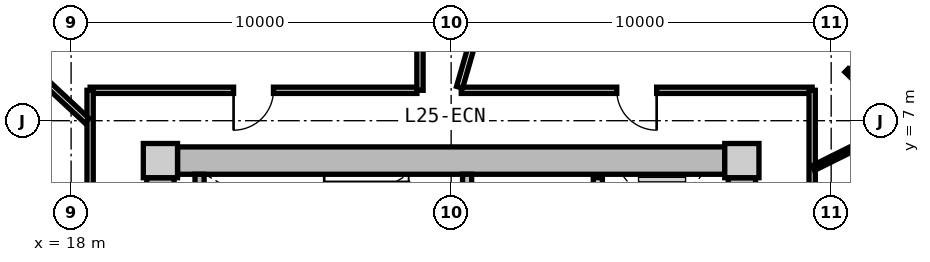
"""IFC4 building model, lengths in metres.
Left out: names, types, materials, properties, quantities, classifications, styles, units other than length and angle.
Written with IfcOpenShell. Run it as: python <this file> out.ifc"""

import sys

from ifc_helpers import new_model, si_unit, direction, frame, frame_2d, origin, origin_2d, place, context, subcontext, project, spatial, rectangle, extrude, source, transform, mapped, element, fill, save


model = new_model("IFC4")
c1 = context("Model", 3, precision=1e-05, world=origin(), true_north=direction((0.0, 1.0)))
c2 = subcontext(c1, "Body", "Model", "MODEL_VIEW")
j1 = project(units=[si_unit("LENGTHUNIT", "METRE"), si_unit("PLANEANGLEUNIT", "RADIAN")], contexts=[c1])
p1 = place(None, origin())
s1 = spatial("IfcSite", under=j1, at=p1, CompositionType="ELEMENT")
p2 = place(p1, origin())
s2 = spatial("IfcBuilding", under=s1, at=p2, CompositionType="ELEMENT")
p3 = place(p2, frame((0.0, 0.0, 84.05)))
s3 = spatial("IfcBuildingStorey", under=s2, at=p3, CompositionType="ELEMENT", Elevation=84.05)
m1 = source(origin(), c2, "Body", "SweptSolid", [
    extrude(rectangle(XDim=0.9, YDim=0.9, at=origin_2d()), origin(), (0.0, 0.0, 1.0), 3.05),
])
for number, where, z_axis, x_axis in (
    (1, (35.65, 5.95, 0.0), (0.0, 0.0, 1.0), (1.0, 0.0, 0.0)),
    (2, (20.35, 5.95, 0.0), (0.0, 0.0, 1.0), (1.0, 0.0, 0.0)),
):
    element("IfcColumn", number, at=place(p3, frame(where, z_axis=z_axis, x_axis=x_axis)), inside=s3, PredefinedType="COLUMN", context=c2, shape_type="MappedRepresentation", body=[
        mapped(m1, transform((0.0, 0.0, 0.0), x_axis=(1.0, 0.0, 0.0), y_axis=(0.0, 1.0, 0.0), z_axis=(0.0, 0.0, 1.0), scale=1.0)),
    ])
m2 = source(origin(), c2, "Body", "SweptSolid", [
    extrude(rectangle(XDim=14.4, YDim=0.72, at=frame_2d((7.2, 0.0))), origin(), (0.0, 0.0, 1.0), 2.79),
])
p4 = place(p3, frame((20.8, 5.95, 0.0), z_axis=(0.0, 0.0, 1.0), x_axis=(1.0, 0.0, 0.0)))
e3 = element("IfcWall", 3, at=p4, inside=s3, PredefinedType="SHEAR", context=c2, shape_type="MappedRepresentation", body=[
    mapped(m2, transform((0.0, 0.0, 0.0), x_axis=(1.0, 0.0, 0.0), y_axis=(0.0, 1.0, 0.0), z_axis=(0.0, 0.0, 1.0), scale=1.0)),
])
m3 = source(origin(), c2, "Body", "SweptSolid", [
    extrude(rectangle(XDim=11.0, YDim=0.72, at=frame_2d((5.5, 0.0))), origin(), (0.0, 0.0, 1.0), 2.79),
])
p5 = place(p3, frame((20.35, -5.5, 0.0), z_axis=(0.0, 0.0, 1.0), x_axis=(0.0, 1.0, 0.0)))
e4 = element("IfcWall", 4, at=p5, inside=s3, PredefinedType="SHEAR", context=c2, shape_type="MappedRepresentation", body=[
    mapped(m3, transform((0.0, 0.0, 0.0), x_axis=(1.0, 0.0, 0.0), y_axis=(0.0, 1.0, 0.0), z_axis=(0.0, 0.0, 1.0), scale=1.0)),
])
p6 = place(p5, frame((3.8, 0.0, 0.0)))
e5 = element("IfcOpeningElement", 5, at=p6, cuts=e4, PredefinedType="OPENING", context=c2, shape_type="SweptSolid", body=[
    extrude(rectangle(XDim=1.2, YDim=2.15, at=frame_2d((0.6, 1.075))), frame((0.0, 0.37, 0.0), z_axis=(0.0, -1.0, 0.0), x_axis=(1.0, 0.0, 0.0)), (0.0, 0.0, 1.0), 0.74),
])
p7 = place(p3, frame((35.65, 5.5, 0.0), z_axis=(0.0, 0.0, 1.0), x_axis=(0.0, -1.0, 0.0)))
e6 = element("IfcWall", 6, at=p7, inside=s3, PredefinedType="SHEAR", context=c2, shape_type="MappedRepresentation", body=[
    mapped(m3, transform((0.0, 0.0, 0.0), x_axis=(1.0, 0.0, 0.0), y_axis=(0.0, 1.0, 0.0), z_axis=(0.0, 0.0, 1.0), scale=1.0)),
])
p8 = place(p7, frame((5.65, 0.0, 0.0)))
e7 = element("IfcOpeningElement", 7, at=p8, cuts=e6, PredefinedType="OPENING", context=c2, shape_type="SweptSolid", body=[
    extrude(rectangle(XDim=1.2, YDim=2.15, at=frame_2d((0.6, 1.075))), frame((0.0, 0.37, 0.0), z_axis=(0.0, -1.0, 0.0), x_axis=(1.0, 0.0, 0.0)), (0.0, 0.0, 1.0), 0.74),
])
m4 = source(origin(), c2, "Body", "SweptSolid", [
    extrude(rectangle(XDim=3.14, YDim=0.24, at=frame_2d((1.57, 0.0))), origin(), (0.0, 0.0, 1.0), 2.79),
])
p9 = place(p3, frame((21.38, 2.45, 0.0), z_axis=(0.0, 0.0, 1.0), x_axis=(0.0, 1.0, 0.0)))
e8 = element("IfcWall", 8, at=p9, inside=s3, PredefinedType="PARTITIONING", context=c2, shape_type="MappedRepresentation", body=[
    mapped(m4, transform((0.0, 0.0, 0.0), x_axis=(1.0, 0.0, 0.0), y_axis=(0.0, 1.0, 0.0), z_axis=(0.0, 0.0, 1.0), scale=1.0)),
])
p10 = place(p3, frame((28.42, 2.45, 0.0), z_axis=(0.0, 0.0, 1.0), x_axis=(0.0, 1.0, 0.0)))
e9 = element("IfcWall", 9, at=p10, inside=s3, PredefinedType="PARTITIONING", context=c2, shape_type="MappedRepresentation", body=[
    mapped(m4, transform((0.0, 0.0, 0.0), x_axis=(1.0, 0.0, 0.0), y_axis=(0.0, 1.0, 0.0), z_axis=(0.0, 0.0, 1.0), scale=1.0)),
])
p11 = place(p10, frame((0.55, 0.0, 0.0)))
e10 = element("IfcOpeningElement", 10, at=p11, cuts=e9, PredefinedType="OPENING", context=c2, shape_type="SweptSolid", body=[
    extrude(rectangle(XDim=1.1, YDim=2.15, at=frame_2d((0.55, 1.075))), frame((0.0, 0.13, 0.0), z_axis=(0.0, -1.0, 0.0), x_axis=(1.0, 0.0, 0.0)), (0.0, 0.0, 1.0), 0.26),
])
m5 = source(origin(), c2, "Body", "SweptSolid", [
    extrude(rectangle(XDim=5.0, YDim=0.24, at=frame_2d((2.5, 0.0))), origin(), (0.0, 0.0, 1.0), 2.775),
])
p12 = place(p3, frame((31.86, 0.5, 0.0), z_axis=(0.0, 0.0, 1.0), x_axis=(0.0, 1.0, 0.0)))
e11 = element("IfcWall", 11, at=p12, inside=s3, PredefinedType="PARTITIONING", context=c2, shape_type="MappedRepresentation", body=[
    mapped(m5, transform((0.0, 0.0, 0.0), x_axis=(1.0, 0.0, 0.0), y_axis=(0.0, 1.0, 0.0), z_axis=(0.0, 0.0, 1.0), scale=1.0)),
])
p13 = place(p12, frame((3.05, 0.0, 0.0)))
e12 = element("IfcOpeningElement", 12, at=p13, cuts=e11, PredefinedType="OPENING", context=c2, shape_type="SweptSolid", body=[
    extrude(rectangle(XDim=1.3, YDim=2.2, at=frame_2d((0.65, 1.1))), frame((0.0, 0.13, 0.0), z_axis=(0.0, -1.0, 0.0), x_axis=(1.0, 0.0, 0.0)), (0.0, 0.0, 1.0), 0.26),
])
p14 = place(p12, frame((0.55, 0.0, 0.0)))
e13 = element("IfcOpeningElement", 13, at=p14, cuts=e11, PredefinedType="OPENING", context=c2, shape_type="SweptSolid", body=[
    extrude(rectangle(XDim=1.3, YDim=2.2, at=frame_2d((0.65, 1.1))), frame((0.0, 0.13, 0.0), z_axis=(0.0, -1.0, 0.0), x_axis=(1.0, 0.0, 0.0)), (0.0, 0.0, 1.0), 0.26),
])
m6 = source(origin(), c2, "Body", "SweptSolid", [
    extrude(rectangle(XDim=8.6, YDim=0.165, at=frame_2d((4.3, 0.0))), origin(), (0.0, 0.0, 1.0), 2.775),
])
p15 = place(p3, frame((18.5, 7.8, 0.0), z_axis=(0.0, 0.0, 1.0), x_axis=(1.0, 0.0, 0.0)))
e14 = element("IfcWall", 14, at=p15, inside=s3, PredefinedType="PARTITIONING", context=c2, shape_type="MappedRepresentation", body=[
    mapped(m6, transform((0.0, 0.0, 0.0), x_axis=(1.0, 0.0, 0.0), y_axis=(0.0, 1.0, 0.0), z_axis=(0.0, 0.0, 1.0), scale=1.0)),
])
p16 = place(p15, frame((3.775, 0.0, 0.0)))
e15 = element("IfcOpeningElement", 15, at=p16, cuts=e14, PredefinedType="OPENING", context=c2, shape_type="SweptSolid", body=[
    extrude(rectangle(XDim=1.05, YDim=2.15, at=frame_2d((0.525, 1.075))), frame((0.0, 0.093, 0.0), z_axis=(0.0, -1.0, 0.0), x_axis=(1.0, 0.0, 0.0)), (0.0, 0.0, 1.0), 0.185),
])
m7 = source(origin(), c2, "Body", "SweptSolid", [
    extrude(rectangle(XDim=9.234, YDim=0.165, at=frame_2d((4.617, 0.0))), origin(), (0.0, 0.0, 1.0), 2.775),
])
p17 = place(p3, frame((28.266, 7.8, 0.0), z_axis=(0.0, 0.0, 1.0), x_axis=(1.0, 0.0, 0.0)))
e16 = element("IfcWall", 16, at=p17, inside=s3, PredefinedType="PARTITIONING", context=c2, shape_type="MappedRepresentation", body=[
    mapped(m7, transform((0.0, 0.0, 0.0), x_axis=(1.0, 0.0, 0.0), y_axis=(0.0, 1.0, 0.0), z_axis=(0.0, 0.0, 1.0), scale=1.0)),
])
p18 = place(p17, frame((4.092, 0.0, 0.0)))
e17 = element("IfcOpeningElement", 17, at=p18, cuts=e16, PredefinedType="OPENING", context=c2, shape_type="SweptSolid", body=[
    extrude(rectangle(XDim=1.05, YDim=2.15, at=frame_2d((0.525, 1.075))), frame((0.0, 0.093, 0.0), z_axis=(0.0, -1.0, 0.0), x_axis=(1.0, 0.0, 0.0)), (0.0, 0.0, 1.0), 0.185),
])
m8 = source(origin(), c2, "Body", "SweptSolid", [
    extrude(rectangle(XDim=15.6, YDim=0.165, at=frame_2d((7.8, 0.0))), origin(), (0.0, 0.0, 1.0), 2.775),
])
p19 = place(p3, frame((18.5, -7.8, 0.0), z_axis=(0.0, 0.0, 1.0), x_axis=(0.0, 1.0, 0.0)))
e18 = element("IfcWall", 18, at=p19, inside=s3, PredefinedType="PARTITIONING", context=c2, shape_type="MappedRepresentation", body=[
    mapped(m8, transform((0.0, 0.0, 0.0), x_axis=(1.0, 0.0, 0.0), y_axis=(0.0, 1.0, 0.0), z_axis=(0.0, 0.0, 1.0), scale=1.0)),
])
p20 = place(p19, frame((7.134, 0.0, 0.0)))
e19 = element("IfcOpeningElement", 19, at=p20, cuts=e18, PredefinedType="OPENING", context=c2, shape_type="SweptSolid", body=[
    extrude(rectangle(XDim=1.25, YDim=2.2, at=frame_2d((0.625, 1.1))), frame((0.0, 0.093, 0.0), z_axis=(0.0, -1.0, 0.0), x_axis=(1.0, 0.0, 0.0)), (0.0, 0.0, 1.0), 0.185),
])
p21 = place(p3, frame((37.5, 7.8, 0.0), z_axis=(0.0, 0.0, 1.0), x_axis=(0.0, -1.0, 0.0)))
e20 = element("IfcWall", 20, at=p21, inside=s3, PredefinedType="PARTITIONING", context=c2, shape_type="MappedRepresentation", body=[
    mapped(m8, transform((0.0, 0.0, 0.0), x_axis=(1.0, 0.0, 0.0), y_axis=(0.0, 1.0, 0.0), z_axis=(0.0, 0.0, 1.0), scale=1.0)),
])
p22 = place(p21, frame((9.177, 0.0, 0.0)))
e21 = element("IfcOpeningElement", 21, at=p22, cuts=e20, PredefinedType="OPENING", context=c2, shape_type="SweptSolid", body=[
    extrude(rectangle(XDim=1.05, YDim=2.15, at=frame_2d((0.525, 1.075))), frame((0.0, 0.093, 0.0), z_axis=(0.0, -1.0, 0.0), x_axis=(1.0, 0.0, 0.0)), (0.0, 0.0, 1.0), 0.185),
])
m9 = source(origin(), c2, "Body", "SweptSolid", [
    extrude(rectangle(XDim=8.989, YDim=0.165, at=frame_2d((4.495, 0.0))), origin(), (0.0, 0.0, 1.0), 2.275),
])
p23 = place(p3, frame((28.222, 7.88, 0.0), z_axis=(0.0, 0.0, 1.0), x_axis=(0.27702323008, 0.960863221274, 0.0)))
e22 = element("IfcWall", 22, at=p23, inside=s3, PredefinedType="PARTITIONING", context=c2, shape_type="MappedRepresentation", body=[
    mapped(m9, transform((0.0, 0.0, 0.0), x_axis=(1.0, 0.0, 0.0), y_axis=(0.0, 1.0, 0.0), z_axis=(0.0, 0.0, 1.0), scale=1.0)),
])
m10 = source(origin(), c2, "Body", "SweptSolid", [
    extrude(rectangle(XDim=7.482, YDim=0.165, at=frame_2d((3.741, 0.0))), origin(), (0.0, 0.0, 1.0), 2.275),
])
p24 = place(p3, frame((18.42, 6.998, 0.0), z_axis=(0.0, 0.0, 1.0), x_axis=(-0.732508698043, 0.680757671489, 0.0)))
e23 = element("IfcWall", 23, at=p24, inside=s3, PredefinedType="PARTITIONING", context=c2, shape_type="MappedRepresentation", body=[
    mapped(m10, transform((0.0, 0.0, 0.0), x_axis=(1.0, 0.0, 0.0), y_axis=(0.0, 1.0, 0.0), z_axis=(0.0, 0.0, 1.0), scale=1.0)),
])
m11 = source(origin(), c2, "Body", "SweptSolid", [
    extrude(rectangle(XDim=7.56, YDim=0.165, at=frame_2d((3.78, 0.0))), origin(), (0.0, 0.0, 1.0), 2.775),
])
p25 = place(p3, frame((27.18, 7.8, 0.0), z_axis=(0.0, 0.0, 1.0), x_axis=(0.0, 1.0, 0.0)))
e24 = element("IfcWall", 24, at=p25, inside=s3, PredefinedType="PARTITIONING", context=c2, shape_type="MappedRepresentation", body=[
    mapped(m11, transform((0.0, 0.0, 0.0), x_axis=(1.0, 0.0, 0.0), y_axis=(0.0, 1.0, 0.0), z_axis=(0.0, 0.0, 1.0), scale=1.0)),
])
m12 = source(origin(), c2, "Body", "SweptSolid", [
    extrude(rectangle(XDim=1.6, YDim=0.14, at=frame_2d((0.8, 0.0))), origin(), (0.0, 0.0, 1.0), 2.775),
])
p26 = place(p3, frame((37.53, 5.754, 0.0), z_axis=(0.0, 0.0, 1.0), x_axis=(0.895522919837, 0.445015393044, 0.0)))
e25 = element("IfcWall", 25, at=p26, inside=s3, PredefinedType="PARTITIONING", context=c2, shape_type="MappedRepresentation", body=[
    mapped(m12, transform((0.0, 0.0, 0.0), x_axis=(1.0, 0.0, 0.0), y_axis=(0.0, 1.0, 0.0), z_axis=(0.0, 0.0, 1.0), scale=1.0)),
])
m13 = source(origin(), c2, "Body", "SweptSolid", [
    extrude(rectangle(XDim=3.902, YDim=0.115, at=frame_2d((1.951, 0.0))), origin(), (0.0, 0.0, 1.0), 2.775),
])
p27 = place(p3, frame((39.46, 7.289, 0.0), z_axis=(0.0, 0.0, 1.0), x_axis=(-0.714853061854, 0.699274695637, 0.0)))
e26 = element("IfcWall", 26, at=p27, inside=s3, PredefinedType="PARTITIONING", context=c2, shape_type="MappedRepresentation", body=[
    mapped(m13, transform((0.0, 0.0, 0.0), x_axis=(1.0, 0.0, 0.0), y_axis=(0.0, 1.0, 0.0), z_axis=(0.0, 0.0, 1.0), scale=1.0)),
])
p28 = place(p27, frame((1.476, 0.0, 0.0)))
e27 = element("IfcOpeningElement", 27, at=p28, cuts=e26, PredefinedType="OPENING", context=c2, shape_type="SweptSolid", body=[
    extrude(rectangle(XDim=0.95, YDim=2.1, at=frame_2d((0.475, 1.05))), frame((0.0, 0.067, 0.0), z_axis=(0.0, -1.0, 0.0), x_axis=(1.0, 0.0, 0.0)), (0.0, 0.0, 1.0), 0.135),
])
m14 = source(origin(), c2, "Body", "SweptSolid", [
    extrude(rectangle(XDim=1.05, YDim=2.15, at=frame_2d((0.525, 1.075))), frame((0.0, 0.025, 0.0), z_axis=(0.0, -1.0, 0.0), x_axis=(1.0, 0.0, 0.0)), (0.0, 0.0, 1.0), 0.05),
])
p29 = place(p16, frame((1.05, 0.0, 0.0), z_axis=(0.0, 0.0, 1.0), x_axis=(-1.0, 0.0, 0.0)))
e28 = element("IfcDoor", 28, at=p29, inside=s3, OperationType="SINGLE_SWING_RIGHT", PredefinedType="DOOR", context=c2, shape_type="MappedRepresentation", body=[
    mapped(m14, transform((0.0, 0.0, 0.0), x_axis=(1.0, 0.0, 0.0), y_axis=(0.0, 1.0, 0.0), z_axis=(0.0, 0.0, 1.0), scale=1.0)),
])
fill(e15, e28)
p30 = place(p18, frame((1.05, 0.0, 0.0), z_axis=(0.0, 0.0, 1.0), x_axis=(-1.0, 0.0, 0.0)))
e29 = element("IfcDoor", 29, at=p30, inside=s3, OperationType="SINGLE_SWING_LEFT", PredefinedType="DOOR", context=c2, shape_type="MappedRepresentation", body=[
    mapped(m14, transform((0.0, 0.0, 0.0), x_axis=(1.0, 0.0, 0.0), y_axis=(0.0, 1.0, 0.0), z_axis=(0.0, 0.0, 1.0), scale=1.0)),
])
fill(e17, e29)
m15 = source(origin(), c2, "Body", "SweptSolid", [
    extrude(rectangle(XDim=0.95, YDim=2.1, at=frame_2d((0.475, 1.05))), frame((0.0, 0.025, 0.0), z_axis=(0.0, -1.0, 0.0), x_axis=(1.0, 0.0, 0.0)), (0.0, 0.0, 1.0), 0.05),
])
p31 = place(p28, frame((0.95, 0.0, 0.0), z_axis=(0.0, 0.0, 1.0), x_axis=(-1.0, 0.0, 0.0)))
e30 = element("IfcDoor", 30, at=p31, inside=s3, OperationType="SINGLE_SWING_LEFT", PredefinedType="DOOR", context=c2, shape_type="MappedRepresentation", body=[
    mapped(m15, transform((0.0, 0.0, 0.0), x_axis=(1.0, 0.0, 0.0), y_axis=(0.0, 1.0, 0.0), z_axis=(0.0, 0.0, 1.0), scale=1.0)),
])
fill(e27, e30)
save(model, sys.argv[1])
